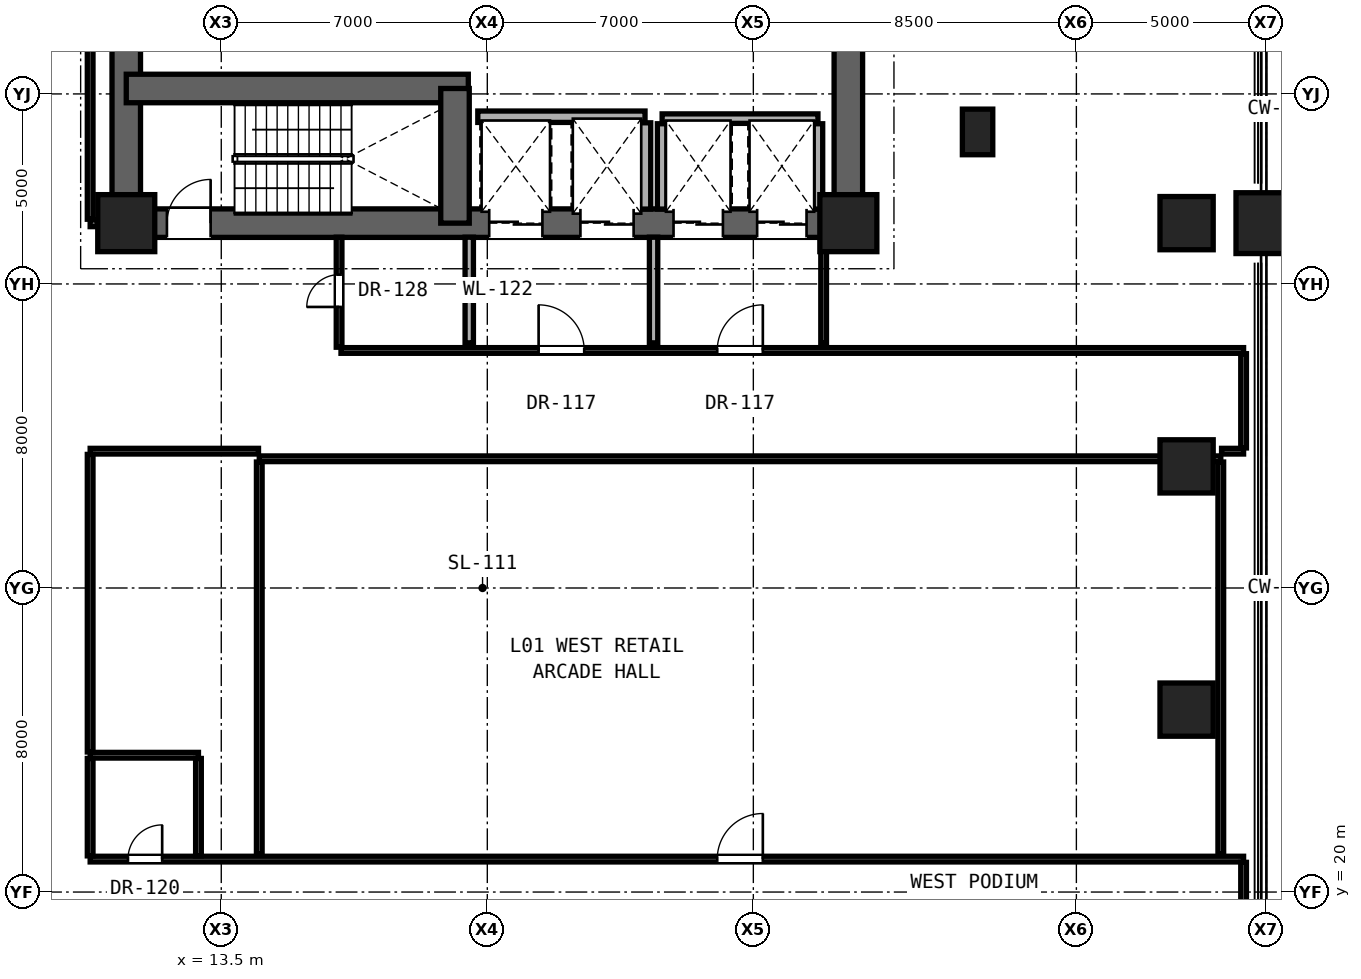
"""IFC4 building model, lengths in metres.
Left out: names, types, materials, properties, quantities, classifications, styles, units other than length and angle.
Written with IfcOpenShell. Run it as: python <this file> out.ifc"""

import sys

from ifc_helpers import new_model, si_unit, direction, frame, frame_2d, origin, origin_2d, place, context, subcontext, project, spatial, rectangle, hollow_rectangle, extrude, element, fill, save


model = new_model("IFC4")
c1 = context("Model", 3, precision=1e-05, world=origin(), true_north=direction((0.0, 1.0)))
c2 = subcontext(c1, "Body", "Model", "MODEL_VIEW")
j1 = project(units=[si_unit("LENGTHUNIT", "METRE"), si_unit("PLANEANGLEUNIT", "RADIAN")], contexts=[c1])
p1 = place(None, origin())
s1 = spatial("IfcSite", under=j1, at=p1, CompositionType="ELEMENT")
p2 = place(p1, origin())
s2 = spatial("IfcBuilding", under=s1, at=p2, CompositionType="ELEMENT")
p3 = place(p2, frame((0.0, 0.0, 5.2)))
s3 = spatial("IfcBuildingStorey", under=s2, at=p3, CompositionType="ELEMENT", Elevation=5.2)
for number, where, z_axis, x_axis in (
    (1, (11.0, 37.6, 0.0), (0.0, 0.0, 1.0), (1.0, 0.0, 0.0)),
    (2, (30.0, 37.6, 0.0), (0.0, 0.0, 1.0), (1.0, 0.0, 0.0)),
):
    element("IfcColumn", number, at=place(p3, frame(where, z_axis=z_axis, x_axis=x_axis)), inside=s3, PredefinedType="COLUMN", context=c2, shape_type="SweptSolid", body=[
        extrude(rectangle(XDim=1.5, YDim=1.5, at=origin_2d()), origin(), (0.0, 0.0, 1.0), 4.3),
    ])
for number, where, z_axis, x_axis in (
    (3, (38.9, 24.8, 0.0), (0.0, 0.0, 1.0), (1.0, 0.0, 0.0)),
    (4, (38.9, 31.2, 0.0), (0.0, 0.0, 1.0), (1.0, 0.0, 0.0)),
    (5, (38.9, 37.6, 0.0), (0.0, 0.0, 1.0), (1.0, 0.0, 0.0)),
):
    element("IfcColumn", number, at=place(p3, frame(where, z_axis=z_axis, x_axis=x_axis)), inside=s3, PredefinedType="COLUMN", context=c2, shape_type="SweptSolid", body=[
        extrude(hollow_rectangle(XDim=1.4, YDim=1.4, WallThickness=0.08, at=origin_2d()), origin(), (0.0, 0.0, 1.0), 4.3),
    ])
p4 = place(p3, frame((33.4, 40.0, 0.0), z_axis=(0.0, 0.0, 1.0), x_axis=(1.0, 0.0, 0.0)))
e6 = element("IfcColumn", 6, at=p4, inside=s3, PredefinedType="PILASTER", context=c2, shape_type="SweptSolid", body=[
    extrude(rectangle(XDim=0.8, YDim=1.2, at=origin_2d()), origin(), (0.0, 0.0, 1.0), 4.3),
])
for number, where, z_axis, x_axis in (
    (7, (11.0, 37.6, 0.0), (0.0, 0.0, 1.0), (0.0, 1.0, 0.0)),
    (8, (30.0, 37.6, 0.0), (0.0, 0.0, 1.0), (0.0, 1.0, 0.0)),
):
    element("IfcWall", number, at=place(p3, frame(where, z_axis=z_axis, x_axis=x_axis)), inside=s3, PredefinedType="SHEAR", context=c2, shape_type="SweptSolid", body=[
        extrude(rectangle(XDim=6.0, YDim=0.75, at=frame_2d((3.0, 0.0))), origin(), (0.0, 0.0, 1.0), 3.98),
    ])
p5 = place(p3, frame((11.0, 37.6, 0.0), z_axis=(0.0, 0.0, 1.0), x_axis=(1.0, 0.0, 0.0)))
e9 = element("IfcWall", 9, at=p5, inside=s3, PredefinedType="SHEAR", context=c2, shape_type="SweptSolid", body=[
    extrude(rectangle(XDim=19.0, YDim=0.75, at=frame_2d((9.5, 0.0))), origin(), (0.0, 0.0, 1.0), 3.98),
])
p6 = place(p5, frame((1.07, 0.0, 0.0)))
e10 = element("IfcOpeningElement", 10, at=p6, cuts=e9, PredefinedType="OPENING", context=c2, shape_type="SweptSolid", body=[
    extrude(rectangle(XDim=1.15, YDim=2.2, at=frame_2d((0.575, 1.1))), frame((0.0, 0.385, 0.0), z_axis=(0.0, -1.0, 0.0), x_axis=(1.0, 0.0, 0.0)), (0.0, 0.0, 1.0), 0.77),
])
p7 = place(p5, frame((9.55, 0.0, 0.0)))
e11 = element("IfcOpeningElement", 11, at=p7, cuts=e9, PredefinedType="OPENING", context=c2, shape_type="SweptSolid", body=[
    extrude(rectangle(XDim=1.4, YDim=2.35, at=frame_2d((0.7, 1.175))), frame((0.0, 0.385, 0.0), z_axis=(0.0, -1.0, 0.0), x_axis=(1.0, 0.0, 0.0)), (0.0, 0.0, 1.0), 0.77),
])
p8 = place(p5, frame((11.95, 0.0, 0.0)))
e12 = element("IfcOpeningElement", 12, at=p8, cuts=e9, PredefinedType="OPENING", context=c2, shape_type="SweptSolid", body=[
    extrude(rectangle(XDim=1.4, YDim=2.35, at=frame_2d((0.7, 1.175))), frame((0.0, 0.385, 0.0), z_axis=(0.0, -1.0, 0.0), x_axis=(1.0, 0.0, 0.0)), (0.0, 0.0, 1.0), 0.77),
])
p9 = place(p5, frame((14.4, 0.0, 0.0)))
e13 = element("IfcOpeningElement", 13, at=p9, cuts=e9, PredefinedType="OPENING", context=c2, shape_type="SweptSolid", body=[
    extrude(rectangle(XDim=1.3, YDim=2.3, at=frame_2d((0.65, 1.15))), frame((0.0, 0.385, 0.0), z_axis=(0.0, -1.0, 0.0), x_axis=(1.0, 0.0, 0.0)), (0.0, 0.0, 1.0), 0.77),
])
p10 = place(p5, frame((16.6, 0.0, 0.0)))
e14 = element("IfcOpeningElement", 14, at=p10, cuts=e9, PredefinedType="OPENING", context=c2, shape_type="SweptSolid", body=[
    extrude(rectangle(XDim=1.3, YDim=2.3, at=frame_2d((0.65, 1.15))), frame((0.0, 0.385, 0.0), z_axis=(0.0, -1.0, 0.0), x_axis=(1.0, 0.0, 0.0)), (0.0, 0.0, 1.0), 0.77),
])
p11 = place(p3, frame((11.0, 41.143, 0.0), z_axis=(0.0, 0.0, 1.0), x_axis=(1.0, 0.0, 0.0)))
e15 = element("IfcWall", 15, at=p11, inside=s3, PredefinedType="SHEAR", context=c2, shape_type="SweptSolid", body=[
    extrude(rectangle(XDim=9.0, YDim=0.75, at=frame_2d((4.5, 0.0))), origin(), (0.0, 0.0, 1.0), 3.98),
])
p12 = place(p3, frame((19.65, 37.6, 0.0), z_axis=(0.0, 0.0, 1.0), x_axis=(0.0, 1.0, 0.0)))
e16 = element("IfcWall", 16, at=p12, inside=s3, PredefinedType="SHEAR", context=c2, shape_type="SweptSolid", body=[
    extrude(rectangle(XDim=3.543, YDim=0.75, at=frame_2d((1.771, 0.0))), origin(), (0.0, 0.0, 1.0), 3.98),
])
p13 = place(p3, frame((41.0, 37.6, 0.0), z_axis=(0.0, 0.0, 1.0), x_axis=(1.0, 0.0, 0.0)))
e17 = element("IfcColumn", 17, at=p13, inside=s3, PredefinedType="COLUMN", context=c2, shape_type="SweptSolid", body=[
    extrude(rectangle(XDim=1.6, YDim=1.6, at=origin_2d()), origin(), (0.0, 0.0, 1.0), 4.3),
])
p14 = place(p3, frame((10.05, 20.867, 0.0), z_axis=(0.0, 0.0, 1.0), x_axis=(1.0, 0.0, 0.0)))
e18 = element("IfcWall", 18, at=p14, inside=s3, PredefinedType="PARTITIONING", context=c2, shape_type="SweptSolid", body=[
    extrude(rectangle(XDim=30.35, YDim=0.15, at=frame_2d((15.175, 0.0))), origin(), (0.0, 0.0, 1.0), 2.932),
])
p15 = place(p14, frame((0.995, 0.0, 0.0)))
e19 = element("IfcOpeningElement", 19, at=p15, cuts=e18, PredefinedType="OPENING", context=c2, shape_type="SweptSolid", body=[
    extrude(rectangle(XDim=0.9, YDim=2.1, at=frame_2d((0.45, 1.05))), frame((0.0, 0.085, 0.0), z_axis=(0.0, -1.0, 0.0), x_axis=(1.0, 0.0, 0.0)), (0.0, 0.0, 1.0), 0.17),
])
p16 = place(p14, frame((16.5, 0.0, 0.0)))
e20 = element("IfcOpeningElement", 20, at=p16, cuts=e18, PredefinedType="OPENING", context=c2, shape_type="SweptSolid", body=[
    extrude(rectangle(XDim=1.2, YDim=2.25, at=frame_2d((0.6, 1.125))), frame((0.0, 0.085, 0.0), z_axis=(0.0, -1.0, 0.0), x_axis=(1.0, 0.0, 0.0)), (0.0, 0.0, 1.0), 0.17),
])
p17 = place(p3, frame((10.05, 23.6, 0.0), z_axis=(0.0, 0.0, 1.0), x_axis=(1.0, 0.0, 0.0)))
e21 = element("IfcWall", 21, at=p17, inside=s3, PredefinedType="PARTITIONING", context=c2, shape_type="SweptSolid", body=[
    extrude(rectangle(XDim=2.85, YDim=0.15, at=frame_2d((1.425, 0.0))), origin(), (0.0, 0.0, 1.0), 2.932),
])
p18 = place(p3, frame((14.5, 31.4, 0.0), z_axis=(0.0, 0.0, 1.0), x_axis=(1.0, 0.0, 0.0)))
e22 = element("IfcWall", 22, at=p18, inside=s3, PredefinedType="PARTITIONING", context=c2, shape_type="SweptSolid", body=[
    extrude(rectangle(XDim=25.3, YDim=0.15, at=frame_2d((12.65, 0.0))), origin(), (0.0, 0.0, 1.0), 2.932),
])
p19 = place(p3, frame((10.05, 31.6, 0.0), z_axis=(0.0, 0.0, 1.0), x_axis=(1.0, 0.0, 0.0)))
e23 = element("IfcWall", 23, at=p19, inside=s3, PredefinedType="PARTITIONING", context=c2, shape_type="SweptSolid", body=[
    extrude(rectangle(XDim=4.43, YDim=0.15, at=frame_2d((2.215, 0.0))), origin(), (0.0, 0.0, 1.0), 2.932),
])
p20 = place(p3, frame((39.82, 31.6, 0.0), z_axis=(0.0, 0.0, 1.0), x_axis=(1.0, 0.0, 0.0)))
e24 = element("IfcWall", 24, at=p20, inside=s3, PredefinedType="PARTITIONING", context=c2, shape_type="SweptSolid", body=[
    extrude(rectangle(XDim=0.58, YDim=0.15, at=frame_2d((0.29, 0.0))), origin(), (0.0, 0.0, 1.0), 3.98),
])
p21 = place(p3, frame((16.65, 34.25, 0.0), z_axis=(0.0, 0.0, 1.0), x_axis=(1.0, 0.0, 0.0)))
e25 = element("IfcWall", 25, at=p21, inside=s3, PredefinedType="PARTITIONING", context=c2, shape_type="SweptSolid", body=[
    extrude(rectangle(XDim=23.75, YDim=0.15, at=frame_2d((11.875, 0.0))), origin(), (0.0, 0.0, 1.0), 2.932),
])
p22 = place(p21, frame((5.2, 0.0, 0.0)))
e26 = element("IfcOpeningElement", 26, at=p22, cuts=e25, PredefinedType="OPENING", context=c2, shape_type="SweptSolid", body=[
    extrude(rectangle(XDim=1.2, YDim=2.25, at=frame_2d((0.6, 1.125))), frame((0.0, 0.085, 0.0), z_axis=(0.0, -1.0, 0.0), x_axis=(1.0, 0.0, 0.0)), (0.0, 0.0, 1.0), 0.17),
])
p23 = place(p21, frame((9.9, 0.0, 0.0)))
e27 = element("IfcOpeningElement", 27, at=p23, cuts=e25, PredefinedType="OPENING", context=c2, shape_type="SweptSolid", body=[
    extrude(rectangle(XDim=1.2, YDim=2.25, at=frame_2d((0.6, 1.125))), frame((0.0, 0.085, 0.0), z_axis=(0.0, -1.0, 0.0), x_axis=(1.0, 0.0, 0.0)), (0.0, 0.0, 1.0), 0.17),
])
p24 = place(p3, frame((10.05, 37.6, 0.0), z_axis=(0.0, 0.0, 1.0), x_axis=(1.0, 0.0, 0.0)))
e28 = element("IfcWall", 28, at=p24, inside=s3, PredefinedType="SHEAR", context=c2, shape_type="SweptSolid", body=[
    extrude(rectangle(XDim=0.185, YDim=0.185, at=frame_2d((0.093, 0.0))), origin(), (0.0, 0.0, 1.0), 3.98),
])
p25 = place(p3, frame((25.1, 40.35, 0.0), z_axis=(0.0, 0.0, 1.0), x_axis=(1.0, 0.0, 0.0)))
e29 = element("IfcWall", 29, at=p25, inside=s3, PredefinedType="SOLIDWALL", context=c2, shape_type="SweptSolid", body=[
    extrude(rectangle(XDim=4.1, YDim=0.25, at=frame_2d((2.05, 0.0))), origin(), (0.0, 0.0, 1.0), 3.98),
])
p26 = place(p3, frame((20.25, 40.4, 0.0), z_axis=(0.0, 0.0, 1.0), x_axis=(1.0, 0.0, 0.0)))
e30 = element("IfcWall", 30, at=p26, inside=s3, PredefinedType="SOLIDWALL", context=c2, shape_type="SweptSolid", body=[
    extrude(rectangle(XDim=4.4, YDim=0.3, at=frame_2d((2.2, 0.0))), origin(), (0.0, 0.0, 1.0), 3.98),
])
p27 = place(p3, frame((10.05, 20.952, 0.0), z_axis=(0.0, 0.0, 1.0), x_axis=(0.0, 1.0, 0.0)))
e31 = element("IfcWall", 31, at=p27, inside=s3, PredefinedType="PARTITIONING", context=c2, shape_type="SweptSolid", body=[
    extrude(rectangle(XDim=2.563, YDim=0.15, at=frame_2d((1.282, 0.0))), origin(), (0.0, 0.0, 1.0), 3.98),
])
p28 = place(p3, frame((10.05, 23.685, 0.0), z_axis=(0.0, 0.0, 1.0), x_axis=(0.0, 1.0, 0.0)))
e32 = element("IfcWall", 32, at=p28, inside=s3, PredefinedType="PARTITIONING", context=c2, shape_type="SweptSolid", body=[
    extrude(rectangle(XDim=7.83, YDim=0.15, at=frame_2d((3.915, 0.0))), origin(), (0.0, 0.0, 1.0), 3.199),
])
p29 = place(p3, frame((10.05, 37.702, 0.0), z_axis=(0.0, 0.0, 1.0), x_axis=(0.0, 1.0, 0.0)))
e33 = element("IfcWall", 33, at=p29, inside=s3, PredefinedType="PARTITIONING", context=c2, shape_type="SweptSolid", body=[
    extrude(rectangle(XDim=8.413, YDim=0.15, at=frame_2d((4.206, 0.0))), origin(), (0.0, 0.0, 1.0), 2.872),
])
p30 = place(p3, frame((12.9, 20.952, 0.0), z_axis=(0.0, 0.0, 1.0), x_axis=(0.0, 1.0, 0.0)))
e34 = element("IfcWall", 34, at=p30, inside=s3, PredefinedType="PARTITIONING", context=c2, shape_type="SweptSolid", body=[
    extrude(rectangle(XDim=2.563, YDim=0.15, at=frame_2d((1.282, 0.0))), origin(), (0.0, 0.0, 1.0), 3.98),
])
p31 = place(p3, frame((14.5, 21.0, 0.0), z_axis=(0.0, 0.0, 1.0), x_axis=(0.0, 1.0, 0.0)))
e35 = element("IfcWall", 35, at=p31, inside=s3, PredefinedType="PARTITIONING", context=c2, shape_type="SweptSolid", body=[
    extrude(rectangle(XDim=10.315, YDim=0.15, at=frame_2d((5.157, 0.0))), origin(), (0.0, 0.0, 1.0), 2.932),
])
p32 = place(p3, frame((16.6, 34.335, 0.0), z_axis=(0.0, 0.0, 1.0), x_axis=(0.0, 1.0, 0.0)))
e36 = element("IfcWall", 36, at=p32, inside=s3, PredefinedType="PARTITIONING", context=c2, shape_type="SweptSolid", body=[
    extrude(rectangle(XDim=2.895, YDim=0.15, at=frame_2d((1.448, 0.0))), origin(), (0.0, 0.0, 1.0), 3.98),
])
p33 = place(p32, frame((1.06, 0.0, 0.0)))
e37 = element("IfcOpeningElement", 37, at=p33, cuts=e36, PredefinedType="OPENING", context=c2, shape_type="SweptSolid", body=[
    extrude(rectangle(XDim=0.85, YDim=2.01, at=frame_2d((0.425, 1.005))), frame((0.0, 0.085, 0.0), z_axis=(0.0, -1.0, 0.0), x_axis=(1.0, 0.0, 0.0)), (0.0, 0.0, 1.0), 0.17),
])
p34 = place(p3, frame((20.025, 34.45, 0.0), z_axis=(0.0, 0.0, 1.0), x_axis=(0.0, 1.0, 0.0)))
e38 = element("IfcWall", 38, at=p34, inside=s3, PredefinedType="SOLIDWALL", context=c2, shape_type="SweptSolid", body=[
    extrude(rectangle(XDim=2.78, YDim=0.22, at=frame_2d((1.39, 0.0))), origin(), (0.0, 0.0, 1.0), 3.98),
])
p35 = place(p3, frame((24.65, 37.97, 0.0), z_axis=(0.0, 0.0, 1.0), x_axis=(0.0, 1.0, 0.0)))
e39 = element("IfcWall", 39, at=p35, inside=s3, PredefinedType="SOLIDWALL", context=c2, shape_type="SweptSolid", body=[
    extrude(rectangle(XDim=2.27, YDim=0.3, at=frame_2d((1.135, 0.0))), origin(), (0.0, 0.0, 1.0), 3.98),
])
p36 = place(p3, frame((24.875, 34.45, 0.0), z_axis=(0.0, 0.0, 1.0), x_axis=(0.0, 1.0, 0.0)))
e40 = element("IfcWall", 40, at=p36, inside=s3, PredefinedType="SOLIDWALL", context=c2, shape_type="SweptSolid", body=[
    extrude(rectangle(XDim=2.78, YDim=0.22, at=frame_2d((1.39, 0.0))), origin(), (0.0, 0.0, 1.0), 3.98),
])
p37 = place(p3, frame((25.1, 37.97, 0.0), z_axis=(0.0, 0.0, 1.0), x_axis=(0.0, 1.0, 0.0)))
e41 = element("IfcWall", 41, at=p37, inside=s3, PredefinedType="SOLIDWALL", context=c2, shape_type="SweptSolid", body=[
    extrude(rectangle(XDim=2.245, YDim=0.25, at=frame_2d((1.123, 0.0))), origin(), (0.0, 0.0, 1.0), 3.98),
])
p38 = place(p3, frame((29.35, 34.45, 0.0), z_axis=(0.0, 0.0, 1.0), x_axis=(0.0, 1.0, 0.0)))
e42 = element("IfcWall", 42, at=p38, inside=s3, PredefinedType="PARTITIONING", context=c2, shape_type="SweptSolid", body=[
    extrude(rectangle(XDim=2.78, YDim=0.15, at=frame_2d((1.39, 0.0))), origin(), (0.0, 0.0, 1.0), 3.98),
])
p39 = place(p3, frame((29.2, 37.97, 0.0), z_axis=(0.0, 0.0, 1.0), x_axis=(0.0, 1.0, 0.0)))
e43 = element("IfcWall", 43, at=p39, inside=s3, PredefinedType="SOLIDWALL", context=c2, shape_type="SweptSolid", body=[
    extrude(rectangle(XDim=2.245, YDim=0.25, at=frame_2d((1.123, 0.0))), origin(), (0.0, 0.0, 1.0), 3.98),
])
p40 = place(p3, frame((39.8, 21.0, 0.0), z_axis=(0.0, 0.0, 1.0), x_axis=(0.0, 1.0, 0.0)))
e44 = element("IfcWall", 44, at=p40, inside=s3, PredefinedType="PARTITIONING", context=c2, shape_type="SweptSolid", body=[
    extrude(rectangle(XDim=10.315, YDim=0.15, at=frame_2d((5.157, 0.0))), origin(), (0.0, 0.0, 1.0), 3.98),
])
p41 = place(p3, frame((40.4, 18.485, 0.0), z_axis=(0.0, 0.0, 1.0), x_axis=(0.0, 1.0, 0.0)))
e45 = element("IfcWall", 45, at=p41, inside=s3, PredefinedType="PARTITIONING", context=c2, shape_type="SweptSolid", body=[
    extrude(rectangle(XDim=2.297, YDim=0.15, at=frame_2d((1.148, 0.0))), origin(), (0.0, 0.0, 1.0), 3.024),
])
p42 = place(p3, frame((40.4, 31.685, 0.0), z_axis=(0.0, 0.0, 1.0), x_axis=(0.0, 1.0, 0.0)))
e46 = element("IfcWall", 46, at=p42, inside=s3, PredefinedType="PARTITIONING", context=c2, shape_type="SweptSolid", body=[
    extrude(rectangle(XDim=2.48, YDim=0.15, at=frame_2d((1.24, 0.0))), origin(), (0.0, 0.0, 1.0), 3.98),
])
p43 = place(p6, origin())
e47 = element("IfcDoor", 47, at=p43, inside=s3, OperationType="SINGLE_SWING_RIGHT", PredefinedType="DOOR", context=c2, shape_type="SweptSolid", body=[
    extrude(rectangle(XDim=1.15, YDim=2.2, at=frame_2d((0.575, 1.1))), frame((0.0, 0.025, 0.0), z_axis=(0.0, -1.0, 0.0), x_axis=(1.0, 0.0, 0.0)), (0.0, 0.0, 1.0), 0.05),
])
fill(e10, e47)
p44 = place(p22, origin())
e48 = element("IfcDoor", 48, at=p44, inside=s3, OperationType="SINGLE_SWING_LEFT", PredefinedType="DOOR", context=c2, shape_type="SweptSolid", body=[
    extrude(rectangle(XDim=1.2, YDim=2.25, at=frame_2d((0.6, 1.125))), frame((0.0, 0.025, 0.0), z_axis=(0.0, -1.0, 0.0), x_axis=(1.0, 0.0, 0.0)), (0.0, 0.0, 1.0), 0.05),
])
fill(e26, e48)
p45 = place(p23, origin())
e49 = element("IfcDoor", 49, at=p45, inside=s3, OperationType="SINGLE_SWING_RIGHT", PredefinedType="DOOR", context=c2, shape_type="SweptSolid", body=[
    extrude(rectangle(XDim=1.2, YDim=2.25, at=frame_2d((0.6, 1.125))), frame((0.0, 0.025, 0.0), z_axis=(0.0, -1.0, 0.0), x_axis=(1.0, 0.0, 0.0)), (0.0, 0.0, 1.0), 0.05),
])
fill(e27, e49)
p46 = place(p33, origin())
e50 = element("IfcDoor", 50, at=p46, inside=s3, OperationType="SINGLE_SWING_LEFT", PredefinedType="DOOR", context=c2, shape_type="SweptSolid", body=[
    extrude(rectangle(XDim=0.85, YDim=2.01, at=frame_2d((0.425, 1.005))), frame((0.0, 0.025, 0.0), z_axis=(0.0, -1.0, 0.0), x_axis=(1.0, 0.0, 0.0)), (0.0, 0.0, 1.0), 0.05),
])
fill(e37, e50)
p47 = place(p15, origin())
e51 = element("IfcDoor", 51, at=p47, inside=s3, OperationType="SINGLE_SWING_RIGHT", PredefinedType="DOOR", context=c2, shape_type="SweptSolid", body=[
    extrude(rectangle(XDim=0.9, YDim=2.1, at=frame_2d((0.45, 1.05))), frame((0.0, 0.025, 0.0), z_axis=(0.0, -1.0, 0.0), x_axis=(1.0, 0.0, 0.0)), (0.0, 0.0, 1.0), 0.05),
])
fill(e19, e51)
p48 = place(p16, origin())
e52 = element("IfcDoor", 52, at=p48, inside=s3, OperationType="SINGLE_SWING_RIGHT", PredefinedType="DOOR", context=c2, shape_type="SweptSolid", body=[
    extrude(rectangle(XDim=1.2, YDim=2.25, at=frame_2d((0.6, 1.125))), frame((0.0, 0.025, 0.0), z_axis=(0.0, -1.0, 0.0), x_axis=(1.0, 0.0, 0.0)), (0.0, 0.0, 1.0), 0.05),
])
fill(e20, e52)
p49 = place(p7, origin())
e53 = element("IfcDoor", 53, at=p49, inside=s3, OperationType="DOUBLE_DOOR_SLIDING", PredefinedType="DOOR", context=c2, shape_type="SweptSolid", body=[
    extrude(rectangle(XDim=1.4, YDim=2.35, at=frame_2d((0.7, 1.175))), frame((0.0, 0.025, 0.0), z_axis=(0.0, -1.0, 0.0), x_axis=(1.0, 0.0, 0.0)), (0.0, 0.0, 1.0), 0.05),
])
fill(e11, e53)
p50 = place(p8, origin())
e54 = element("IfcDoor", 54, at=p50, inside=s3, OperationType="DOUBLE_DOOR_SLIDING", PredefinedType="DOOR", context=c2, shape_type="SweptSolid", body=[
    extrude(rectangle(XDim=1.4, YDim=2.35, at=frame_2d((0.7, 1.175))), frame((0.0, 0.025, 0.0), z_axis=(0.0, -1.0, 0.0), x_axis=(1.0, 0.0, 0.0)), (0.0, 0.0, 1.0), 0.05),
])
fill(e12, e54)
p51 = place(p9, origin())
e55 = element("IfcDoor", 55, at=p51, inside=s3, OperationType="DOUBLE_DOOR_SLIDING", PredefinedType="DOOR", context=c2, shape_type="SweptSolid", body=[
    extrude(rectangle(XDim=1.3, YDim=2.3, at=frame_2d((0.65, 1.15))), frame((0.0, 0.025, 0.0), z_axis=(0.0, -1.0, 0.0), x_axis=(1.0, 0.0, 0.0)), (0.0, 0.0, 1.0), 0.05),
])
fill(e13, e55)
p52 = place(p10, origin())
e56 = element("IfcDoor", 56, at=p52, inside=s3, OperationType="DOUBLE_DOOR_SLIDING", PredefinedType="DOOR", context=c2, shape_type="SweptSolid", body=[
    extrude(rectangle(XDim=1.3, YDim=2.3, at=frame_2d((0.65, 1.15))), frame((0.0, 0.025, 0.0), z_axis=(0.0, -1.0, 0.0), x_axis=(1.0, 0.0, 0.0)), (0.0, 0.0, 1.0), 0.05),
])
fill(e14, e56)
save(model, sys.argv[1])
